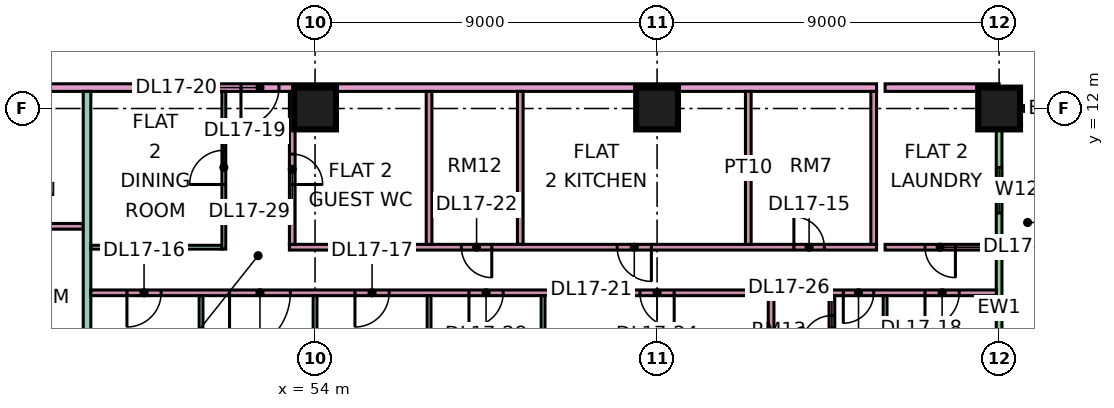
"""IFC4 building model, lengths in metres.
Left out: names, types, materials, properties, quantities, classifications, styles, units other than length and angle.
Written with IfcOpenShell. Run it as: python <this file> out.ifc"""

import sys

from ifc_helpers import new_model, si_unit, direction, frame, frame_2d, origin, origin_2d, place, context, subcontext, project, spatial, rectangle, extrude, element, fill, save


model = new_model("IFC4")
c1 = context("Model", 3, precision=1e-05, world=origin(), true_north=direction((0.0, 1.0)))
c2 = subcontext(c1, "Body", "Model", "MODEL_VIEW")
j1 = project(units=[si_unit("LENGTHUNIT", "METRE"), si_unit("PLANEANGLEUNIT", "RADIAN")], contexts=[c1])
p1 = place(None, origin())
s1 = spatial("IfcSite", under=j1, at=p1, CompositionType="ELEMENT")
p2 = place(p1, origin())
s2 = spatial("IfcBuilding", under=s1, at=p2, CompositionType="ELEMENT")
p3 = place(p2, frame((0.0, 0.0, 78.9)))
s3 = spatial("IfcBuildingStorey", under=s2, at=p3, CompositionType="ELEMENT", Elevation=78.9)
for number, where, z_axis, x_axis in (
    (1, (54.0, 12.0, 0.0), (0.0, 0.0, 1.0), (1.0, 0.0, 0.0)),
    (2, (63.0, 12.0, 0.0), (0.0, 0.0, 1.0), (1.0, 0.0, 0.0)),
    (3, (72.0, 12.0, 0.0), (0.0, 0.0, 1.0), (1.0, 0.0, 0.0)),
):
    element("IfcColumn", number, at=place(p3, frame(where, z_axis=z_axis, x_axis=x_axis)), inside=s3, PredefinedType="COLUMN", context=c2, shape_type="SweptSolid", body=[
        extrude(rectangle(XDim=1.1, YDim=1.1, at=origin_2d()), origin(), (0.0, 0.0, 1.0), 3.75),
    ])
p4 = place(p3, frame((72.0, 1.575, 0.0), z_axis=(0.0, 0.0, 1.0), x_axis=(0.0, 1.0, 0.0)))
e4 = element("IfcWall", 4, at=p4, inside=s3, PredefinedType="SOLIDWALL", context=c2, shape_type="SweptSolid", body=[
    extrude(rectangle(XDim=10.35, YDim=0.15, at=frame_2d((5.175, 0.0))), origin(), (0.0, 0.0, 1.0), 3.35),
])
p5 = place(p4, frame((1.887, 0.0, 0.0)))
e5 = element("IfcOpeningElement", 5, at=p5, cuts=e4, PredefinedType="OPENING", context=c2, shape_type="SweptSolid", body=[
    extrude(rectangle(XDim=1.8, YDim=2.4, at=frame_2d((0.9, 1.2))), frame((0.0, 0.085, 0.0), z_axis=(0.0, -1.0, 0.0), x_axis=(1.0, 0.0, 0.0)), (0.0, 0.0, 1.0), 0.17),
])
p6 = place(p4, frame((7.675, 0.0, 1.7)))
e6 = element("IfcOpeningElement", 6, at=p6, cuts=e4, PredefinedType="OPENING", context=c2, shape_type="SweptSolid", body=[
    extrude(rectangle(XDim=1.2, YDim=0.9, at=frame_2d((0.6, 0.45))), frame((0.0, 0.085, 0.0), z_axis=(0.0, -1.0, 0.0), x_axis=(1.0, 0.0, 0.0)), (0.0, 0.0, 1.0), 0.17),
])
p7 = place(p3, frame((73.5, 12.0, 0.0), z_axis=(0.0, 0.0, 1.0), x_axis=(-1.0, 0.0, 0.0)))
e7 = element("IfcWall", 7, at=p7, inside=s3, PredefinedType="SOLIDWALL", context=c2, shape_type="SweptSolid", body=[
    extrude(rectangle(XDim=1.5, YDim=0.15, at=frame_2d((0.75, 0.0))), origin(), (0.0, 0.0, 1.0), 3.35),
])
p8 = place(p3, frame((40.65, 12.55, 0.0), z_axis=(0.0, 0.0, 1.0), x_axis=(1.0, 0.0, 0.0)))
e8 = element("IfcWall", 8, at=p8, inside=s3, PredefinedType="PARTITIONING", context=c2, shape_type="SweptSolid", body=[
    extrude(rectangle(XDim=28.125, YDim=0.2, at=frame_2d((14.062, 0.0))), origin(), (0.0, 0.0, 1.0), 3.35),
])
p9 = place(p8, frame((11.4, 0.0, 0.0)))
e9 = element("IfcOpeningElement", 9, at=p9, cuts=e8, PredefinedType="OPENING", context=c2, shape_type="SweptSolid", body=[
    extrude(rectangle(XDim=1.0, YDim=2.1, at=frame_2d((0.5, 1.05))), frame((0.0, 0.11, 0.0), z_axis=(0.0, -1.0, 0.0), x_axis=(1.0, 0.0, 0.0)), (0.0, 0.0, 1.0), 0.22),
])
p10 = place(p8, frame((1.05, 0.0, 0.0)))
e10 = element("IfcOpeningElement", 10, at=p10, cuts=e8, PredefinedType="OPENING", context=c2, shape_type="SweptSolid", body=[
    extrude(rectangle(XDim=1.0, YDim=2.1, at=frame_2d((0.5, 1.05))), frame((0.0, 0.11, 0.0), z_axis=(0.0, -1.0, 0.0), x_axis=(1.0, 0.0, 0.0)), (0.0, 0.0, 1.0), 0.22),
])
p11 = place(p3, frame((43.725, 8.9, 0.0), z_axis=(0.0, 0.0, 1.0), x_axis=(1.0, 0.0, 0.0)))
e11 = element("IfcWall", 11, at=p11, inside=s3, PredefinedType="PARTITIONING", context=c2, shape_type="SweptSolid", body=[
    extrude(rectangle(XDim=4.175, YDim=0.15, at=frame_2d((2.087, 0.0))), origin(), (0.0, 0.0, 1.0), 3.35),
])
p12 = place(p3, frame((48.0, 0.0, 0.0), z_axis=(0.0, 0.0, 1.0), x_axis=(0.0, 1.0, 0.0)))
e12 = element("IfcWall", 12, at=p12, inside=s3, PredefinedType="PARTITIONING", context=c2, shape_type="SweptSolid", body=[
    extrude(rectangle(XDim=12.45, YDim=0.2, at=frame_2d((6.225, 0.0))), origin(), (0.0, 0.0, 1.0), 3.35),
])
p13 = place(p3, frame((48.1, 7.15, 0.0), z_axis=(0.0, 0.0, 1.0), x_axis=(1.0, 0.0, 0.0)))
e13 = element("IfcWall", 13, at=p13, inside=s3, PredefinedType="PARTITIONING", context=c2, shape_type="SweptSolid", body=[
    extrude(rectangle(XDim=23.826, YDim=0.15, at=frame_2d((11.913, 0.0))), origin(), (0.0, 0.0, 1.0), 3.35),
])
p14 = place(p13, frame((0.95, 0.0, 0.0)))
e14 = element("IfcOpeningElement", 14, at=p14, cuts=e13, PredefinedType="OPENING", context=c2, shape_type="SweptSolid", body=[
    extrude(rectangle(XDim=0.9, YDim=2.1, at=frame_2d((0.45, 1.05))), frame((0.0, 0.085, 0.0), z_axis=(0.0, -1.0, 0.0), x_axis=(1.0, 0.0, 0.0)), (0.0, 0.0, 1.0), 0.17),
])
p15 = place(p13, frame((6.95, 0.0, 0.0)))
e15 = element("IfcOpeningElement", 15, at=p15, cuts=e13, PredefinedType="OPENING", context=c2, shape_type="SweptSolid", body=[
    extrude(rectangle(XDim=0.9, YDim=2.1, at=frame_2d((0.45, 1.05))), frame((0.0, 0.085, 0.0), z_axis=(0.0, -1.0, 0.0), x_axis=(1.0, 0.0, 0.0)), (0.0, 0.0, 1.0), 0.17),
])
p16 = place(p13, frame((21.95, 0.0, 0.0)))
e16 = element("IfcOpeningElement", 16, at=p16, cuts=e13, PredefinedType="OPENING", context=c2, shape_type="SweptSolid", body=[
    extrude(rectangle(XDim=0.9, YDim=2.1, at=frame_2d((0.45, 1.05))), frame((0.0, 0.085, 0.0), z_axis=(0.0, -1.0, 0.0), x_axis=(1.0, 0.0, 0.0)), (0.0, 0.0, 1.0), 0.17),
])
p17 = place(p13, frame((14.45, 0.0, 0.0)))
e17 = element("IfcOpeningElement", 17, at=p17, cuts=e13, PredefinedType="OPENING", context=c2, shape_type="SweptSolid", body=[
    extrude(rectangle(XDim=0.9, YDim=2.1, at=frame_2d((0.45, 1.05))), frame((0.0, 0.085, 0.0), z_axis=(0.0, -1.0, 0.0), x_axis=(1.0, 0.0, 0.0)), (0.0, 0.0, 1.0), 0.17),
])
p18 = place(p13, frame((19.8, 0.0, 0.0)))
e18 = element("IfcOpeningElement", 18, at=p18, cuts=e13, PredefinedType="OPENING", context=c2, shape_type="SweptSolid", body=[
    extrude(rectangle(XDim=0.8, YDim=2.1, at=frame_2d((0.4, 1.05))), frame((0.0, 0.085, 0.0), z_axis=(0.0, -1.0, 0.0), x_axis=(1.0, 0.0, 0.0)), (0.0, 0.0, 1.0), 0.17),
])
p19 = place(p13, frame((3.65, 0.0, 0.0)))
e19 = element("IfcOpeningElement", 19, at=p19, cuts=e13, PredefinedType="OPENING", context=c2, shape_type="SweptSolid", body=[
    extrude(rectangle(XDim=1.6, YDim=2.1, at=frame_2d((0.8, 1.05))), frame((0.0, 0.085, 0.0), z_axis=(0.0, -1.0, 0.0), x_axis=(1.0, 0.0, 0.0)), (0.0, 0.0, 1.0), 0.17),
])
p20 = place(p13, frame((9.95, 0.0, 0.0)))
e20 = element("IfcOpeningElement", 20, at=p20, cuts=e13, PredefinedType="OPENING", context=c2, shape_type="SweptSolid", body=[
    extrude(rectangle(XDim=0.9, YDim=2.1, at=frame_2d((0.45, 1.05))), frame((0.0, 0.085, 0.0), z_axis=(0.0, -1.0, 0.0), x_axis=(1.0, 0.0, 0.0)), (0.0, 0.0, 1.0), 0.17),
])
p21 = place(p3, frame((48.1, 8.35, 0.0), z_axis=(0.0, 0.0, 1.0), x_axis=(1.0, 0.0, 0.0)))
e21 = element("IfcWall", 21, at=p21, inside=s3, PredefinedType="PARTITIONING", context=c2, shape_type="SweptSolid", body=[
    extrude(rectangle(XDim=3.45, YDim=0.1, at=frame_2d((1.725, 0.0))), origin(), (0.0, 0.0, 1.0), 3.35),
])
p22 = place(p3, frame((51.0, 0.074, 0.0), z_axis=(0.0, 0.0, 1.0), x_axis=(0.0, 1.0, 0.0)))
e22 = element("IfcWall", 22, at=p22, inside=s3, PredefinedType="PARTITIONING", context=c2, shape_type="SweptSolid", body=[
    extrude(rectangle(XDim=7.001, YDim=0.1, at=frame_2d((3.5, 0.0))), origin(), (0.0, 0.0, 1.0), 3.35),
])
p23 = place(p3, frame((51.6, 8.3, 0.0), z_axis=(0.0, 0.0, 1.0), x_axis=(0.0, 1.0, 0.0)))
e23 = element("IfcWall", 23, at=p23, inside=s3, PredefinedType="PARTITIONING", context=c2, shape_type="SweptSolid", body=[
    extrude(rectangle(XDim=4.15, YDim=0.1, at=frame_2d((2.075, 0.0))), origin(), (0.0, 0.0, 1.0), 3.35),
])
p24 = place(p23, frame((1.7, 0.0, 0.0)))
e24 = element("IfcOpeningElement", 24, at=p24, cuts=e23, PredefinedType="OPENING", context=c2, shape_type="SweptSolid", body=[
    extrude(rectangle(XDim=0.9, YDim=2.1, at=frame_2d((0.45, 1.05))), frame((0.0, 0.06, 0.0), z_axis=(0.0, -1.0, 0.0), x_axis=(1.0, 0.0, 0.0)), (0.0, 0.0, 1.0), 0.12),
])
p25 = place(p3, frame((53.325, 8.35, 0.0), z_axis=(0.0, 0.0, 1.0), x_axis=(1.0, 0.0, 0.0)))
e25 = element("IfcWall", 25, at=p25, inside=s3, PredefinedType="PARTITIONING", context=c2, shape_type="SweptSolid", body=[
    extrude(rectangle(XDim=15.45, YDim=0.15, at=frame_2d((7.725, 0.0))), origin(), (0.0, 0.0, 1.0), 3.35),
])
p26 = place(p25, frame((13.275, 0.0, 0.0)))
e26 = element("IfcOpeningElement", 26, at=p26, cuts=e25, PredefinedType="OPENING", context=c2, shape_type="SweptSolid", body=[
    extrude(rectangle(XDim=0.8, YDim=2.1, at=frame_2d((0.4, 1.05))), frame((0.0, 0.085, 0.0), z_axis=(0.0, -1.0, 0.0), x_axis=(1.0, 0.0, 0.0)), (0.0, 0.0, 1.0), 0.17),
])
p27 = place(p25, frame((8.625, 0.0, 0.0)))
e27 = element("IfcOpeningElement", 27, at=p27, cuts=e25, PredefinedType="OPENING", context=c2, shape_type="SweptSolid", body=[
    extrude(rectangle(XDim=0.9, YDim=2.1, at=frame_2d((0.45, 1.05))), frame((0.0, 0.085, 0.0), z_axis=(0.0, -1.0, 0.0), x_axis=(1.0, 0.0, 0.0)), (0.0, 0.0, 1.0), 0.17),
])
p28 = place(p25, frame((4.525, 0.0, 0.0)))
e28 = element("IfcOpeningElement", 28, at=p28, cuts=e25, PredefinedType="OPENING", context=c2, shape_type="SweptSolid", body=[
    extrude(rectangle(XDim=0.8, YDim=2.1, at=frame_2d((0.4, 1.05))), frame((0.0, 0.085, 0.0), z_axis=(0.0, -1.0, 0.0), x_axis=(1.0, 0.0, 0.0)), (0.0, 0.0, 1.0), 0.17),
])
p29 = place(p3, frame((53.4, 8.425, 0.0), z_axis=(0.0, 0.0, 1.0), x_axis=(0.0, 1.0, 0.0)))
e29 = element("IfcWall", 29, at=p29, inside=s3, PredefinedType="PARTITIONING", context=c2, shape_type="SweptSolid", body=[
    extrude(rectangle(XDim=4.025, YDim=0.15, at=frame_2d((2.012, 0.0))), origin(), (0.0, 0.0, 1.0), 3.35),
])
p30 = place(p29, frame((1.575, 0.0, 0.0)))
e30 = element("IfcOpeningElement", 30, at=p30, cuts=e29, PredefinedType="OPENING", context=c2, shape_type="SweptSolid", body=[
    extrude(rectangle(XDim=0.8, YDim=2.1, at=frame_2d((0.4, 1.05))), frame((0.0, 0.085, 0.0), z_axis=(0.0, -1.0, 0.0), x_axis=(1.0, 0.0, 0.0)), (0.0, 0.0, 1.0), 0.17),
])
for number, where, z_axis, x_axis in (
    (31, (54.0, 0.074, 0.0), (0.0, 0.0, 1.0), (0.0, 1.0, 0.0)),
    (32, (57.0, 0.074, 0.0), (0.0, 0.0, 1.0), (0.0, 1.0, 0.0)),
):
    element("IfcWall", number, at=place(p3, frame(where, z_axis=z_axis, x_axis=x_axis)), inside=s3, PredefinedType="PARTITIONING", context=c2, shape_type="SweptSolid", body=[
        extrude(rectangle(XDim=7.001, YDim=0.1, at=frame_2d((3.5, 0.0))), origin(), (0.0, 0.0, 1.0), 3.35),
    ])
for number, where, z_axis, x_axis in (
    (33, (57.0, 8.425, 0.0), (0.0, 0.0, 1.0), (0.0, 1.0, 0.0)),
    (34, (59.4, 8.425, 0.0), (0.0, 0.0, 1.0), (0.0, 1.0, 0.0)),
):
    element("IfcWall", number, at=place(p3, frame(where, z_axis=z_axis, x_axis=x_axis)), inside=s3, PredefinedType="PARTITIONING", context=c2, shape_type="SweptSolid", body=[
        extrude(rectangle(XDim=4.025, YDim=0.15, at=frame_2d((2.012, 0.0))), origin(), (0.0, 0.0, 1.0), 3.35),
    ])
p31 = place(p3, frame((60.0, 0.0, 0.0), z_axis=(0.0, 0.0, 1.0), x_axis=(0.0, 1.0, 0.0)))
e35 = element("IfcWall", 35, at=p31, inside=s3, PredefinedType="PARTITIONING", context=c2, shape_type="SweptSolid", body=[
    extrude(rectangle(XDim=7.075, YDim=0.1, at=frame_2d((3.538, 0.0))), origin(), (0.0, 0.0, 1.0), 3.35),
])
p32 = place(p3, frame((65.4, 8.425, 0.0), z_axis=(0.0, 0.0, 1.0), x_axis=(0.0, 1.0, 0.0)))
e36 = element("IfcWall", 36, at=p32, inside=s3, PredefinedType="PARTITIONING", context=c2, shape_type="SweptSolid", body=[
    extrude(rectangle(XDim=4.025, YDim=0.15, at=frame_2d((2.012, 0.0))), origin(), (0.0, 0.0, 1.0), 3.35),
])
p33 = place(p3, frame((66.0, -1.35, 0.0), z_axis=(0.0, 0.0, 1.0), x_axis=(0.0, 1.0, 0.0)))
e37 = element("IfcWall", 37, at=p33, inside=s3, PredefinedType="PARTITIONING", context=c2, shape_type="SweptSolid", body=[
    extrude(rectangle(XDim=8.425, YDim=0.15, at=frame_2d((4.212, 0.0))), origin(), (0.0, 0.0, 1.0), 3.35),
])
p34 = place(p3, frame((67.6, 5.075, 0.0), z_axis=(0.0, 0.0, 1.0), x_axis=(0.0, 1.0, 0.0)))
e38 = element("IfcWall", 38, at=p34, inside=s3, PredefinedType="PARTITIONING", context=c2, shape_type="SweptSolid", body=[
    extrude(rectangle(XDim=2.0, YDim=0.15, at=frame_2d((1.0, 0.0))), origin(), (0.0, 0.0, 1.0), 3.35),
])
p35 = place(p34, frame((0.675, 0.0, 0.0)))
e39 = element("IfcOpeningElement", 39, at=p35, cuts=e38, PredefinedType="OPENING", context=c2, shape_type="SweptSolid", body=[
    extrude(rectangle(XDim=0.8, YDim=2.1, at=frame_2d((0.4, 1.05))), frame((0.0, 0.085, 0.0), z_axis=(0.0, -1.0, 0.0), x_axis=(1.0, 0.0, 0.0)), (0.0, 0.0, 1.0), 0.17),
])
p36 = place(p3, frame((68.7, 8.425, 0.0), z_axis=(0.0, 0.0, 1.0), x_axis=(0.0, 1.0, 0.0)))
e40 = element("IfcWall", 40, at=p36, inside=s3, PredefinedType="PARTITIONING", context=c2, shape_type="SweptSolid", body=[
    extrude(rectangle(XDim=4.025, YDim=0.15, at=frame_2d((2.012, 0.0))), origin(), (0.0, 0.0, 1.0), 3.35),
])
p37 = place(p3, frame((69.0, -1.351, 0.0), z_axis=(0.0, 0.0, 1.0), x_axis=(0.0, 1.0, 0.0)))
e41 = element("IfcWall", 41, at=p37, inside=s3, PredefinedType="PARTITIONING", context=c2, shape_type="SweptSolid", body=[
    extrude(rectangle(XDim=8.426, YDim=0.1, at=frame_2d((4.213, 0.0))), origin(), (0.0, 0.0, 1.0), 3.35),
])
p38 = place(p3, frame((69.0, 8.35, 0.0), z_axis=(0.0, 0.0, 1.0), x_axis=(1.0, 0.0, 0.0)))
e42 = element("IfcWall", 42, at=p38, inside=s3, PredefinedType="PARTITIONING", context=c2, shape_type="SweptSolid", body=[
    extrude(rectangle(XDim=2.926, YDim=0.15, at=frame_2d((1.463, 0.0))), origin(), (0.0, 0.0, 1.0), 3.35),
])
p39 = place(p38, frame((1.05, 0.0, 0.0)))
e43 = element("IfcOpeningElement", 43, at=p39, cuts=e42, PredefinedType="OPENING", context=c2, shape_type="SweptSolid", body=[
    extrude(rectangle(XDim=0.8, YDim=2.1, at=frame_2d((0.4, 1.05))), frame((0.0, 0.085, 0.0), z_axis=(0.0, -1.0, 0.0), x_axis=(1.0, 0.0, 0.0)), (0.0, 0.0, 1.0), 0.17),
])
p40 = place(p3, frame((69.0, 12.55, 0.0), z_axis=(0.0, 0.0, 1.0), x_axis=(1.0, 0.0, 0.0)))
e44 = element("IfcWall", 44, at=p40, inside=s3, PredefinedType="PARTITIONING", context=c2, shape_type="SweptSolid", body=[
    extrude(rectangle(XDim=3.0, YDim=0.2, at=frame_2d((1.5, 0.0))), origin(), (0.0, 0.0, 1.0), 3.35),
])
p41 = place(p6, origin())
e45 = element("IfcWindow", 45, at=p41, inside=s3, PartitioningType="SINGLE_PANEL", PredefinedType="WINDOW", context=c2, shape_type="SweptSolid", body=[
    extrude(rectangle(XDim=1.2, YDim=0.9, at=frame_2d((0.6, 0.45))), frame((0.0, 0.03, 0.0), z_axis=(0.0, -1.0, 0.0), x_axis=(1.0, 0.0, 0.0)), (0.0, 0.0, 1.0), 0.06),
])
fill(e6, e45)
p42 = place(p26, origin())
e46 = element("IfcDoor", 46, at=p42, inside=s3, OperationType="SINGLE_SWING_LEFT", PredefinedType="DOOR", context=c2, shape_type="SweptSolid", body=[
    extrude(rectangle(XDim=0.8, YDim=2.1, at=frame_2d((0.4, 1.05))), frame((0.0, 0.025, 0.0), z_axis=(0.0, -1.0, 0.0), x_axis=(1.0, 0.0, 0.0)), (0.0, 0.0, 1.0), 0.05),
])
fill(e26, e46)
p43 = place(p14, frame((0.9, 0.0, 0.0), z_axis=(0.0, 0.0, 1.0), x_axis=(-1.0, 0.0, 0.0)))
e47 = element("IfcDoor", 47, at=p43, inside=s3, OperationType="SINGLE_SWING_LEFT", PredefinedType="DOOR", context=c2, shape_type="SweptSolid", body=[
    extrude(rectangle(XDim=0.9, YDim=2.1, at=frame_2d((0.45, 1.05))), frame((0.0, 0.025, 0.0), z_axis=(0.0, -1.0, 0.0), x_axis=(1.0, 0.0, 0.0)), (0.0, 0.0, 1.0), 0.05),
])
fill(e14, e47)
p44 = place(p15, frame((0.9, 0.0, 0.0), z_axis=(0.0, 0.0, 1.0), x_axis=(-1.0, 0.0, 0.0)))
e48 = element("IfcDoor", 48, at=p44, inside=s3, OperationType="SINGLE_SWING_LEFT", PredefinedType="DOOR", context=c2, shape_type="SweptSolid", body=[
    extrude(rectangle(XDim=0.9, YDim=2.1, at=frame_2d((0.45, 1.05))), frame((0.0, 0.025, 0.0), z_axis=(0.0, -1.0, 0.0), x_axis=(1.0, 0.0, 0.0)), (0.0, 0.0, 1.0), 0.05),
])
fill(e15, e48)
p45 = place(p16, frame((0.9, 0.0, 0.0), z_axis=(0.0, 0.0, 1.0), x_axis=(-1.0, 0.0, 0.0)))
e49 = element("IfcDoor", 49, at=p45, inside=s3, OperationType="SINGLE_SWING_LEFT", PredefinedType="DOOR", context=c2, shape_type="SweptSolid", body=[
    extrude(rectangle(XDim=0.9, YDim=2.1, at=frame_2d((0.45, 1.05))), frame((0.0, 0.025, 0.0), z_axis=(0.0, -1.0, 0.0), x_axis=(1.0, 0.0, 0.0)), (0.0, 0.0, 1.0), 0.05),
])
fill(e16, e49)
p46 = place(p24, origin())
e50 = element("IfcDoor", 50, at=p46, inside=s3, OperationType="SINGLE_SWING_LEFT", PredefinedType="DOOR", context=c2, shape_type="SweptSolid", body=[
    extrude(rectangle(XDim=0.9, YDim=2.1, at=frame_2d((0.45, 1.05))), frame((0.0, 0.025, 0.0), z_axis=(0.0, -1.0, 0.0), x_axis=(1.0, 0.0, 0.0)), (0.0, 0.0, 1.0), 0.05),
])
fill(e24, e50)
p47 = place(p9, frame((1.0, 0.0, 0.0), z_axis=(0.0, 0.0, 1.0), x_axis=(-1.0, 0.0, 0.0)))
e51 = element("IfcDoor", 51, at=p47, inside=s3, OperationType="SINGLE_SWING_LEFT", PredefinedType="DOOR", context=c2, shape_type="SweptSolid", body=[
    extrude(rectangle(XDim=1.0, YDim=2.1, at=frame_2d((0.5, 1.05))), frame((0.0, 0.025, 0.0), z_axis=(0.0, -1.0, 0.0), x_axis=(1.0, 0.0, 0.0)), (0.0, 0.0, 1.0), 0.05),
])
fill(e9, e51)
p48 = place(p27, origin())
e52 = element("IfcDoor", 52, at=p48, inside=s3, OperationType="SINGLE_SWING_RIGHT", PredefinedType="DOOR", context=c2, shape_type="SweptSolid", body=[
    extrude(rectangle(XDim=0.9, YDim=2.1, at=frame_2d((0.45, 1.05))), frame((0.0, 0.025, 0.0), z_axis=(0.0, -1.0, 0.0), x_axis=(1.0, 0.0, 0.0)), (0.0, 0.0, 1.0), 0.05),
])
fill(e27, e52)
p49 = place(p28, origin())
e53 = element("IfcDoor", 53, at=p49, inside=s3, OperationType="SINGLE_SWING_RIGHT", PredefinedType="DOOR", context=c2, shape_type="SweptSolid", body=[
    extrude(rectangle(XDim=0.8, YDim=2.1, at=frame_2d((0.4, 1.05))), frame((0.0, 0.025, 0.0), z_axis=(0.0, -1.0, 0.0), x_axis=(1.0, 0.0, 0.0)), (0.0, 0.0, 1.0), 0.05),
])
fill(e28, e53)
p50 = place(p39, origin())
e54 = element("IfcDoor", 54, at=p50, inside=s3, OperationType="SINGLE_SWING_RIGHT", PredefinedType="DOOR", context=c2, shape_type="SweptSolid", body=[
    extrude(rectangle(XDim=0.8, YDim=2.1, at=frame_2d((0.4, 1.05))), frame((0.0, 0.025, 0.0), z_axis=(0.0, -1.0, 0.0), x_axis=(1.0, 0.0, 0.0)), (0.0, 0.0, 1.0), 0.05),
])
fill(e43, e54)
p51 = place(p17, origin())
e55 = element("IfcDoor", 55, at=p51, inside=s3, OperationType="SINGLE_SWING_RIGHT", PredefinedType="DOOR", context=c2, shape_type="SweptSolid", body=[
    extrude(rectangle(XDim=0.9, YDim=2.1, at=frame_2d((0.45, 1.05))), frame((0.0, 0.025, 0.0), z_axis=(0.0, -1.0, 0.0), x_axis=(1.0, 0.0, 0.0)), (0.0, 0.0, 1.0), 0.05),
])
fill(e17, e55)
p52 = place(p18, frame((0.8, 0.0, 0.0), z_axis=(0.0, 0.0, 1.0), x_axis=(-1.0, 0.0, 0.0)))
e56 = element("IfcDoor", 56, at=p52, inside=s3, OperationType="SINGLE_SWING_LEFT", PredefinedType="DOOR", context=c2, shape_type="SweptSolid", body=[
    extrude(rectangle(XDim=0.8, YDim=2.1, at=frame_2d((0.4, 1.05))), frame((0.0, 0.025, 0.0), z_axis=(0.0, -1.0, 0.0), x_axis=(1.0, 0.0, 0.0)), (0.0, 0.0, 1.0), 0.05),
])
fill(e18, e56)
p53 = place(p35, origin())
e57 = element("IfcDoor", 57, at=p53, inside=s3, OperationType="SINGLE_SWING_LEFT", PredefinedType="DOOR", context=c2, shape_type="SweptSolid", body=[
    extrude(rectangle(XDim=0.8, YDim=2.1, at=frame_2d((0.4, 1.05))), frame((0.0, 0.025, 0.0), z_axis=(0.0, -1.0, 0.0), x_axis=(1.0, 0.0, 0.0)), (0.0, 0.0, 1.0), 0.05),
])
fill(e39, e57)
p54 = place(p19, frame((1.6, 0.0, 0.0), z_axis=(0.0, 0.0, 1.0), x_axis=(-1.0, 0.0, 0.0)))
e58 = element("IfcDoor", 58, at=p54, inside=s3, OperationType="DOUBLE_DOOR_SINGLE_SWING", PredefinedType="DOOR", context=c2, shape_type="SweptSolid", body=[
    extrude(rectangle(XDim=1.6, YDim=2.1, at=frame_2d((0.8, 1.05))), frame((0.0, 0.025, 0.0), z_axis=(0.0, -1.0, 0.0), x_axis=(1.0, 0.0, 0.0)), (0.0, 0.0, 1.0), 0.05),
])
fill(e19, e58)
p55 = place(p20, frame((0.9, 0.0, 0.0), z_axis=(0.0, 0.0, 1.0), x_axis=(-1.0, 0.0, 0.0)))
e59 = element("IfcDoor", 59, at=p55, inside=s3, OperationType="SINGLE_SWING_LEFT", PredefinedType="DOOR", context=c2, shape_type="SweptSolid", body=[
    extrude(rectangle(XDim=0.9, YDim=2.1, at=frame_2d((0.45, 1.05))), frame((0.0, 0.025, 0.0), z_axis=(0.0, -1.0, 0.0), x_axis=(1.0, 0.0, 0.0)), (0.0, 0.0, 1.0), 0.05),
])
fill(e20, e59)
p56 = place(p30, frame((0.8, 0.0, 0.0), z_axis=(0.0, 0.0, 1.0), x_axis=(-1.0, 0.0, 0.0)))
e60 = element("IfcDoor", 60, at=p56, inside=s3, OperationType="SINGLE_SWING_LEFT", PredefinedType="DOOR", context=c2, shape_type="SweptSolid", body=[
    extrude(rectangle(XDim=0.8, YDim=2.1, at=frame_2d((0.4, 1.05))), frame((0.0, 0.025, 0.0), z_axis=(0.0, -1.0, 0.0), x_axis=(1.0, 0.0, 0.0)), (0.0, 0.0, 1.0), 0.05),
])
fill(e30, e60)
save(model, sys.argv[1])
